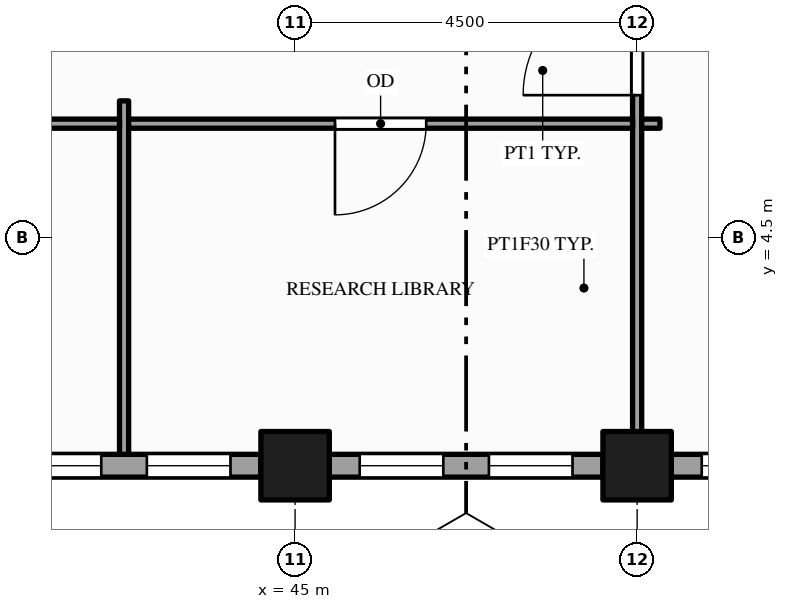
"""IFC4 building model, lengths in metres.
Left out: names, types, materials, properties, quantities, classifications, styles, units other than length and angle.
Written with IfcOpenShell. Run it as: python <this file> out.ifc"""

import sys

from ifc_helpers import new_model, si_unit, direction, frame, frame_2d, origin, origin_2d, place, context, subcontext, project, spatial, rectangle, hollow_rectangle, extrude, element, fill, save


model = new_model("IFC4")
c1 = context("Model", 3, precision=1e-05, world=origin(), true_north=direction((0.0, 1.0)))
c2 = subcontext(c1, "Body", "Model", "MODEL_VIEW")
j1 = project(units=[si_unit("LENGTHUNIT", "METRE"), si_unit("PLANEANGLEUNIT", "RADIAN")], contexts=[c1])
p1 = place(None, origin())
s1 = spatial("IfcSite", under=j1, at=p1, CompositionType="ELEMENT")
p2 = place(p1, origin())
s2 = spatial("IfcBuilding", under=s1, at=p2, CompositionType="ELEMENT")
p3 = place(p2, frame((0.0, 0.0, 159.0)))
s3 = spatial("IfcBuildingStorey", under=s2, at=p3, CompositionType="ELEMENT", Elevation=159.0)
for number, where, z_axis, x_axis in (
    (1, (45.0, 1.5, -0.15), (0.0, 0.0, 1.0), (1.0, 0.0, 0.0)),
    (2, (49.5, 1.5, -0.15), (0.0, 0.0, 1.0), (1.0, 0.0, 0.0)),
):
    element("IfcColumn", number, at=place(p3, frame(where, z_axis=z_axis, x_axis=x_axis)), inside=s3, PredefinedType="COLUMN", context=c2, shape_type="SweptSolid", body=[
        extrude(hollow_rectangle(XDim=0.9, YDim=0.9, WallThickness=0.045, at=origin_2d()), origin(), (0.0, 0.0, 1.0), 4.0),
    ])
p4 = place(p3, frame((40.95, 1.5, 0.0), z_axis=(0.0, 0.0, 1.0), x_axis=(1.0, 0.0, 0.0)))
e3 = element("IfcWall", 3, at=p4, inside=s3, PredefinedType="STANDARD", context=c2, shape_type="SweptSolid", body=[
    extrude(rectangle(XDim=3.6, YDim=0.3, at=frame_2d((1.8, 0.0))), origin(), (0.0, 0.0, 1.0), 2.87),
])
p5 = place(p4, frame((0.4, 0.0, 0.9)))
e4 = element("IfcOpeningElement", 4, at=p5, cuts=e3, PredefinedType="OPENING", context=c2, shape_type="SweptSolid", body=[
    extrude(rectangle(XDim=1.1, YDim=1.75, at=frame_2d((0.55, 0.875))), frame((0.0, 0.16, 0.0), z_axis=(0.0, -1.0, 0.0), x_axis=(1.0, 0.0, 0.0)), (0.0, 0.0, 1.0), 0.32),
])
p6 = place(p4, frame((2.1, 0.0, 0.9)))
e5 = element("IfcOpeningElement", 5, at=p6, cuts=e3, PredefinedType="OPENING", context=c2, shape_type="SweptSolid", body=[
    extrude(rectangle(XDim=1.1, YDim=1.75, at=frame_2d((0.55, 0.875))), frame((0.0, 0.16, 0.0), z_axis=(0.0, -1.0, 0.0), x_axis=(1.0, 0.0, 0.0)), (0.0, 0.0, 1.0), 0.32),
])
p7 = place(p3, frame((45.45, 1.5, 0.0), z_axis=(0.0, 0.0, 1.0), x_axis=(1.0, 0.0, 0.0)))
e6 = element("IfcWall", 6, at=p7, inside=s3, PredefinedType="STANDARD", context=c2, shape_type="SweptSolid", body=[
    extrude(rectangle(XDim=3.6, YDim=0.3, at=frame_2d((1.8, 0.0))), origin(), (0.0, 0.0, 1.0), 2.87),
])
p8 = place(p7, frame((0.4, 0.0, 0.9)))
e7 = element("IfcOpeningElement", 7, at=p8, cuts=e6, PredefinedType="OPENING", context=c2, shape_type="SweptSolid", body=[
    extrude(rectangle(XDim=1.1, YDim=1.75, at=frame_2d((0.55, 0.875))), frame((0.0, 0.16, 0.0), z_axis=(0.0, -1.0, 0.0), x_axis=(1.0, 0.0, 0.0)), (0.0, 0.0, 1.0), 0.32),
])
p9 = place(p7, frame((2.1, 0.0, 0.9)))
e8 = element("IfcOpeningElement", 8, at=p9, cuts=e6, PredefinedType="OPENING", context=c2, shape_type="SweptSolid", body=[
    extrude(rectangle(XDim=1.1, YDim=1.75, at=frame_2d((0.55, 0.875))), frame((0.0, 0.16, 0.0), z_axis=(0.0, -1.0, 0.0), x_axis=(1.0, 0.0, 0.0)), (0.0, 0.0, 1.0), 0.32),
])
p10 = place(p3, frame((49.95, 1.5, 0.0), z_axis=(0.0, 0.0, 1.0), x_axis=(1.0, 0.0, 0.0)))
e9 = element("IfcWall", 9, at=p10, inside=s3, PredefinedType="STANDARD", context=c2, shape_type="SweptSolid", body=[
    extrude(rectangle(XDim=4.05, YDim=0.3, at=frame_2d((2.025, 0.0))), origin(), (0.0, 0.0, 1.0), 2.87),
])
p11 = place(p10, frame((0.4, 0.0, 0.9)))
e10 = element("IfcOpeningElement", 10, at=p11, cuts=e9, PredefinedType="OPENING", context=c2, shape_type="SweptSolid", body=[
    extrude(rectangle(XDim=1.1, YDim=1.75, at=frame_2d((0.55, 0.875))), frame((0.0, 0.16, 0.0), z_axis=(0.0, -1.0, 0.0), x_axis=(1.0, 0.0, 0.0)), (0.0, 0.0, 1.0), 0.32),
])
p12 = place(p10, frame((2.1, 0.0, 0.9)))
e11 = element("IfcOpeningElement", 11, at=p12, cuts=e9, PredefinedType="OPENING", context=c2, shape_type="SweptSolid", body=[
    extrude(rectangle(XDim=1.55, YDim=1.75, at=frame_2d((0.775, 0.875))), frame((0.0, 0.16, 0.0), z_axis=(0.0, -1.0, 0.0), x_axis=(1.0, 0.0, 0.0)), (0.0, 0.0, 1.0), 0.32),
])
p13 = place(p3, frame((42.75, 1.65, 0.0), z_axis=(0.0, 0.0, 1.0), x_axis=(0.0, 1.0, 0.0)))
e12 = element("IfcWall", 12, at=p13, inside=s3, PredefinedType="PARTITIONING", context=c2, shape_type="SweptSolid", body=[
    extrude(rectangle(XDim=4.65, YDim=0.12, at=frame_2d((2.325, 0.0))), origin(), (0.0, 0.0, 1.0), 2.87),
])
p14 = place(p3, frame((49.5, 1.65, 0.0), z_axis=(0.0, 0.0, 1.0), x_axis=(0.0, 1.0, 0.0)))
e13 = element("IfcWall", 13, at=p14, inside=s3, PredefinedType="PARTITIONING", context=c2, shape_type="SweptSolid", body=[
    extrude(rectangle(XDim=22.2, YDim=0.12, at=frame_2d((11.1, 0.0))), origin(), (0.0, 0.0, 1.0), 2.87),
])
p15 = place(p14, frame((4.725, 0.0, 0.0)))
e14 = element("IfcOpeningElement", 14, at=p15, cuts=e13, PredefinedType="OPENING", context=c2, shape_type="SweptSolid", body=[
    extrude(rectangle(XDim=1.5, YDim=2.1, at=frame_2d((0.75, 1.05))), frame((0.0, 0.07, 0.0), z_axis=(0.0, -1.0, 0.0), x_axis=(1.0, 0.0, 0.0)), (0.0, 0.0, 1.0), 0.14),
])
p16 = place(p14, frame((15.975, 0.0, 0.0)))
e15 = element("IfcOpeningElement", 15, at=p16, cuts=e13, PredefinedType="OPENING", context=c2, shape_type="SweptSolid", body=[
    extrude(rectangle(XDim=1.5, YDim=2.1, at=frame_2d((0.75, 1.05))), frame((0.0, 0.07, 0.0), z_axis=(0.0, -1.0, 0.0), x_axis=(1.0, 0.0, 0.0)), (0.0, 0.0, 1.0), 0.14),
])
p17 = place(p14, frame((7.6, 0.0, 0.0)))
e16 = element("IfcOpeningElement", 16, at=p17, cuts=e13, PredefinedType="OPENING", context=c2, shape_type="SweptSolid", body=[
    extrude(rectangle(XDim=0.9, YDim=2.1, at=frame_2d((0.45, 1.05))), frame((0.0, 0.07, 0.0), z_axis=(0.0, -1.0, 0.0), x_axis=(1.0, 0.0, 0.0)), (0.0, 0.0, 1.0), 0.14),
])
p18 = place(p14, frame((10.65, 0.0, 0.0)))
e17 = element("IfcOpeningElement", 17, at=p18, cuts=e13, PredefinedType="OPENING", context=c2, shape_type="SweptSolid", body=[
    extrude(rectangle(XDim=0.9, YDim=2.1, at=frame_2d((0.45, 1.05))), frame((0.0, 0.07, 0.0), z_axis=(0.0, -1.0, 0.0), x_axis=(1.0, 0.0, 0.0)), (0.0, 0.0, 1.0), 0.14),
])
p19 = place(p14, frame((13.6, 0.0, 0.0)))
e18 = element("IfcOpeningElement", 18, at=p19, cuts=e13, PredefinedType="OPENING", context=c2, shape_type="SweptSolid", body=[
    extrude(rectangle(XDim=1.0, YDim=2.1, at=frame_2d((0.5, 1.05))), frame((0.0, 0.07, 0.0), z_axis=(0.0, -1.0, 0.0), x_axis=(1.0, 0.0, 0.0)), (0.0, 0.0, 1.0), 0.14),
])
p20 = place(p3, frame((38.31, 6.0, 0.0), z_axis=(0.0, 0.0, 1.0), x_axis=(1.0, 0.0, 0.0)))
e19 = element("IfcWall", 19, at=p20, inside=s3, PredefinedType="PARTITIONING", context=c2, shape_type="SweptSolid", body=[
    extrude(rectangle(XDim=4.38, YDim=0.12, at=frame_2d((2.19, 0.0))), origin(), (0.0, 0.0, 1.0), 2.87),
])
p21 = place(p20, frame((1.69, 0.0, 0.0)))
e20 = element("IfcOpeningElement", 20, at=p21, cuts=e19, PredefinedType="OPENING", context=c2, shape_type="SweptSolid", body=[
    extrude(rectangle(XDim=1.0, YDim=2.1, at=frame_2d((0.5, 1.05))), frame((0.0, 0.07, 0.0), z_axis=(0.0, -1.0, 0.0), x_axis=(1.0, 0.0, 0.0)), (0.0, 0.0, 1.0), 0.14),
])
p22 = place(p3, frame((42.81, 6.0, 0.0), z_axis=(0.0, 0.0, 1.0), x_axis=(1.0, 0.0, 0.0)))
e21 = element("IfcWall", 21, at=p22, inside=s3, PredefinedType="PARTITIONING", context=c2, shape_type="SweptSolid", body=[
    extrude(rectangle(XDim=6.63, YDim=0.12, at=frame_2d((3.315, 0.0))), origin(), (0.0, 0.0, 1.0), 2.87),
])
p23 = place(p22, frame((2.715, 0.0, 0.0)))
e22 = element("IfcOpeningElement", 22, at=p23, cuts=e21, PredefinedType="OPENING", context=c2, shape_type="SweptSolid", body=[
    extrude(rectangle(XDim=1.2, YDim=2.1, at=frame_2d((0.6, 1.05))), frame((0.0, 0.07, 0.0), z_axis=(0.0, -1.0, 0.0), x_axis=(1.0, 0.0, 0.0)), (0.0, 0.0, 1.0), 0.14),
])
p24 = place(p3, frame((49.56, 6.0, 0.0), z_axis=(0.0, 0.0, 1.0), x_axis=(1.0, 0.0, 0.0)))
e23 = element("IfcWall", 23, at=p24, inside=s3, PredefinedType="PARTITIONING", context=c2, shape_type="SweptSolid", body=[
    extrude(rectangle(XDim=0.24, YDim=0.12, at=frame_2d((0.12, 0.0))), origin(), (0.0, 0.0, 1.0), 2.87),
])
p25 = place(p5, origin())
e24 = element("IfcWindow", 24, at=p25, inside=s3, PartitioningType="SINGLE_PANEL", PredefinedType="WINDOW", context=c2, shape_type="SweptSolid", body=[
    extrude(rectangle(XDim=1.1, YDim=1.75, at=frame_2d((0.55, 0.875))), frame((0.0, 0.03, 0.0), z_axis=(0.0, -1.0, 0.0), x_axis=(1.0, 0.0, 0.0)), (0.0, 0.0, 1.0), 0.06),
])
fill(e4, e24)
p26 = place(p6, origin())
e25 = element("IfcWindow", 25, at=p26, inside=s3, PartitioningType="SINGLE_PANEL", PredefinedType="WINDOW", context=c2, shape_type="SweptSolid", body=[
    extrude(rectangle(XDim=1.1, YDim=1.75, at=frame_2d((0.55, 0.875))), frame((0.0, 0.03, 0.0), z_axis=(0.0, -1.0, 0.0), x_axis=(1.0, 0.0, 0.0)), (0.0, 0.0, 1.0), 0.06),
])
fill(e5, e25)
p27 = place(p8, origin())
e26 = element("IfcWindow", 26, at=p27, inside=s3, PartitioningType="SINGLE_PANEL", PredefinedType="WINDOW", context=c2, shape_type="SweptSolid", body=[
    extrude(rectangle(XDim=1.1, YDim=1.75, at=frame_2d((0.55, 0.875))), frame((0.0, 0.03, 0.0), z_axis=(0.0, -1.0, 0.0), x_axis=(1.0, 0.0, 0.0)), (0.0, 0.0, 1.0), 0.06),
])
fill(e7, e26)
p28 = place(p9, origin())
e27 = element("IfcWindow", 27, at=p28, inside=s3, PartitioningType="SINGLE_PANEL", PredefinedType="WINDOW", context=c2, shape_type="SweptSolid", body=[
    extrude(rectangle(XDim=1.1, YDim=1.75, at=frame_2d((0.55, 0.875))), frame((0.0, 0.03, 0.0), z_axis=(0.0, -1.0, 0.0), x_axis=(1.0, 0.0, 0.0)), (0.0, 0.0, 1.0), 0.06),
])
fill(e8, e27)
p29 = place(p11, origin())
e28 = element("IfcWindow", 28, at=p29, inside=s3, PartitioningType="SINGLE_PANEL", PredefinedType="WINDOW", context=c2, shape_type="SweptSolid", body=[
    extrude(rectangle(XDim=1.1, YDim=1.75, at=frame_2d((0.55, 0.875))), frame((0.0, 0.03, 0.0), z_axis=(0.0, -1.0, 0.0), x_axis=(1.0, 0.0, 0.0)), (0.0, 0.0, 1.0), 0.06),
])
fill(e10, e28)
p30 = place(p15, origin())
e29 = element("IfcDoor", 29, at=p30, inside=s3, OperationType="SINGLE_SWING_LEFT", PredefinedType="DOOR", context=c2, shape_type="SweptSolid", body=[
    extrude(rectangle(XDim=1.5, YDim=2.1, at=frame_2d((0.75, 1.05))), frame((0.0, 0.025, 0.0), z_axis=(0.0, -1.0, 0.0), x_axis=(1.0, 0.0, 0.0)), (0.0, 0.0, 1.0), 0.05),
])
fill(e14, e29)
p31 = place(p23, origin())
e30 = element("IfcDoor", 30, at=p31, inside=s3, OperationType="SINGLE_SWING_LEFT", PredefinedType="DOOR", context=c2, shape_type="SweptSolid", body=[
    extrude(rectangle(XDim=1.2, YDim=2.1, at=frame_2d((0.6, 1.05))), frame((0.0, 0.025, 0.0), z_axis=(0.0, -1.0, 0.0), x_axis=(1.0, 0.0, 0.0)), (0.0, 0.0, 1.0), 0.05),
])
fill(e22, e30)
save(model, sys.argv[1])
